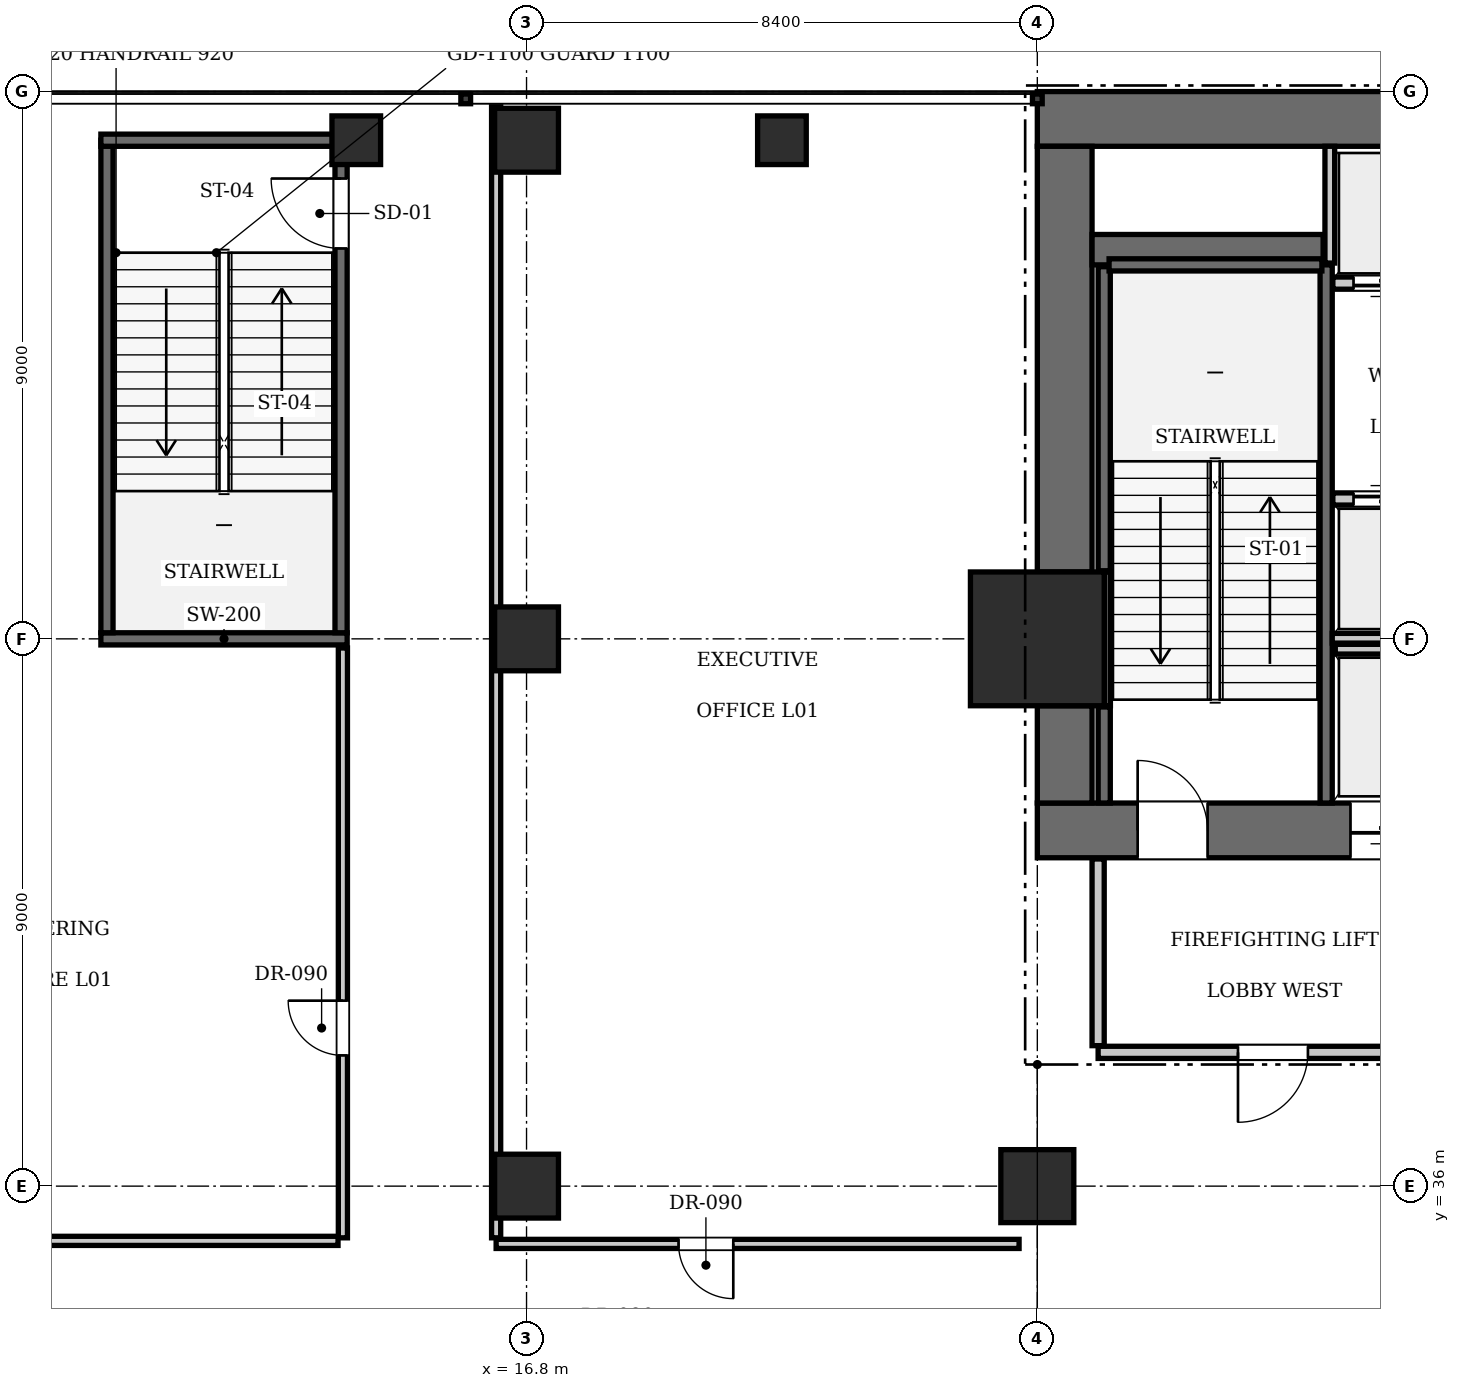
"""IFC4 building model, lengths in metres.
Left out: names, types, materials, properties, quantities, classifications, styles, units other than length and angle.
Written with IfcOpenShell. Run it as: python <this file> out.ifc"""

import sys

from ifc_helpers import new_model, si_unit, direction, frame, frame_2d, origin, origin_2d, place, context, subcontext, project, spatial, rectangle, extrude, element, fill, save


model = new_model("IFC4")
c1 = context("Model", 3, precision=1e-05, world=origin(), true_north=direction((0.0, 1.0)))
c2 = subcontext(c1, "Body", "Model", "MODEL_VIEW")
j1 = project(units=[si_unit("LENGTHUNIT", "METRE"), si_unit("PLANEANGLEUNIT", "RADIAN")], contexts=[c1])
p1 = place(None, origin())
s1 = spatial("IfcSite", under=j1, at=p1, CompositionType="ELEMENT")
p2 = place(p1, origin())
s2 = spatial("IfcBuilding", under=s1, at=p2, CompositionType="ELEMENT")
p3 = place(p2, frame((0.0, 0.0, 5.6)))
s3 = spatial("IfcBuildingStorey", under=s2, at=p3, CompositionType="ELEMENT", Elevation=5.6)
p4 = place(p3, frame((25.2, 45.0, 0.0), z_axis=(0.0, 0.0, 1.0), x_axis=(1.0, 0.0, 0.0)))
e1 = element("IfcColumn", 1, at=p4, inside=s3, PredefinedType="COLUMN", context=c2, shape_type="SweptSolid", body=[
    extrude(rectangle(XDim=2.2, YDim=2.2, at=origin_2d()), origin(), (0.0, 0.0, 1.0), 5.25),
])
p5 = place(p3, frame((25.2, 53.55, 0.0), z_axis=(0.0, 0.0, 1.0), x_axis=(1.0, 0.0, 0.0)))
e2 = element("IfcWall", 2, at=p5, inside=s3, PredefinedType="SHEAR", context=c2, shape_type="SweptSolid", body=[
    extrude(rectangle(XDim=25.2, YDim=0.9, at=frame_2d((12.6, 0.0))), origin(), (0.0, 0.0, 1.0), 5.25),
])
p6 = place(p3, frame((25.2, 41.85, 0.0), z_axis=(0.0, 0.0, 1.0), x_axis=(1.0, 0.0, 0.0)))
e3 = element("IfcWall", 3, at=p6, inside=s3, PredefinedType="SHEAR", context=c2, shape_type="SweptSolid", body=[
    extrude(rectangle(XDim=6.8, YDim=0.9, at=frame_2d((3.4, 0.0))), origin(), (0.0, 0.0, 1.0), 5.25),
])
p7 = place(p6, frame((1.65, 0.0, 0.0)))
e4 = element("IfcOpeningElement", 4, at=p7, cuts=e3, PredefinedType="OPENING", context=c2, shape_type="SweptSolid", body=[
    extrude(rectangle(XDim=1.15, YDim=2.15, at=frame_2d((0.575, 1.075))), frame((0.0, 0.46, 0.0), z_axis=(0.0, -1.0, 0.0), x_axis=(1.0, 0.0, 0.0)), (0.0, 0.0, 1.0), 0.92),
])
p8 = place(p6, frame((5.15, 0.0, 0.0)))
e5 = element("IfcOpeningElement", 5, at=p8, cuts=e3, PredefinedType="OPENING", context=c2, shape_type="SweptSolid", body=[
    extrude(rectangle(XDim=1.1, YDim=2.2, at=frame_2d((0.55, 1.1))), frame((0.0, 0.46, 0.0), z_axis=(0.0, -1.0, 0.0), x_axis=(1.0, 0.0, 0.0)), (0.0, 0.0, 1.0), 0.92),
])
p9 = place(p3, frame((25.65, 42.3, 0.0), z_axis=(0.0, 0.0, 1.0), x_axis=(0.0, 1.0, 0.0)))
e6 = element("IfcWall", 6, at=p9, inside=s3, PredefinedType="SHEAR", context=c2, shape_type="SweptSolid", body=[
    extrude(rectangle(XDim=1.6, YDim=0.9, at=frame_2d((0.8, 0.0))), origin(), (0.0, 0.0, 1.0), 5.25),
])
p10 = place(p3, frame((25.65, 46.1, 0.0), z_axis=(0.0, 0.0, 1.0), x_axis=(0.0, 1.0, 0.0)))
e7 = element("IfcWall", 7, at=p10, inside=s3, PredefinedType="SHEAR", context=c2, shape_type="SweptSolid", body=[
    extrude(rectangle(XDim=7.0, YDim=0.9, at=frame_2d((3.5, 0.0))), origin(), (0.0, 0.0, 1.0), 5.25),
])
p11 = place(p3, frame((26.1, 51.4, 0.0), z_axis=(0.0, 0.0, 1.0), x_axis=(1.0, 0.0, 0.0)))
e8 = element("IfcWall", 8, at=p11, inside=s3, PredefinedType="SHEAR", context=c2, shape_type="SweptSolid", body=[
    extrude(rectangle(XDim=3.8, YDim=0.5, at=frame_2d((1.9, 0.0))), origin(), (0.0, 0.0, 1.0), 5.25),
])
p12 = place(p3, frame((25.2, 36.0, 0.0), z_axis=(0.0, 0.0, 1.0), x_axis=(1.0, 0.0, 0.0)))
e9 = element("IfcColumn", 9, at=p12, inside=s3, PredefinedType="COLUMN", context=c2, shape_type="SweptSolid", body=[
    extrude(rectangle(XDim=1.2, YDim=1.2, at=origin_2d()), origin(), (0.0, 0.0, 1.0), 5.25),
])
for number, where, z_axis, x_axis in (
    (10, (16.8, 36.0, 0.0), (0.0, 0.0, 1.0), (1.0, 0.0, 0.0)),
    (11, (16.8, 45.0, 0.0), (0.0, 0.0, 1.0), (1.0, 0.0, 0.0)),
    (12, (16.8, 53.2, 0.0), (0.0, 0.0, 1.0), (1.0, 0.0, 0.0)),
):
    element("IfcColumn", number, at=place(p3, frame(where, z_axis=z_axis, x_axis=x_axis)), inside=s3, PredefinedType="COLUMN", context=c2, shape_type="SweptSolid", body=[
        extrude(rectangle(XDim=1.05, YDim=1.05, at=origin_2d()), origin(), (0.0, 0.0, 1.0), 5.25),
    ])
for number, where, z_axis, x_axis in (
    (13, (14.0, 53.2, 0.0), (0.0, 0.0, 1.0), (1.0, 0.0, 0.0)),
    (14, (21.0, 53.2, 0.0), (0.0, 0.0, 1.0), (1.0, 0.0, 0.0)),
):
    element("IfcColumn", number, at=place(p3, frame(where, z_axis=z_axis, x_axis=x_axis)), inside=s3, PredefinedType="PILASTER", context=c2, shape_type="SweptSolid", body=[
        extrude(rectangle(XDim=0.8, YDim=0.8, at=origin_2d()), origin(), (0.0, 0.0, 1.0), 5.25),
    ])
p13 = place(p3, frame((29.95, 42.3, 0.0), z_axis=(0.0, 0.0, 1.0), x_axis=(0.0, 1.0, 0.0)))
e15 = element("IfcWall", 15, at=p13, inside=s3, PredefinedType="SOLIDWALL", context=c2, shape_type="SweptSolid", body=[
    extrude(rectangle(XDim=8.85, YDim=0.2, at=frame_2d((4.425, 0.0))), origin(), (0.0, 0.0, 1.0), 4.97),
])
p14 = place(p3, frame((26.3, 42.3, 0.0), z_axis=(0.0, 0.0, 1.0), x_axis=(0.0, 1.0, 0.0)))
e16 = element("IfcWall", 16, at=p14, inside=s3, PredefinedType="SOLIDWALL", context=c2, shape_type="SweptSolid", body=[
    extrude(rectangle(XDim=1.58, YDim=0.2, at=frame_2d((0.79, 0.0))), origin(), (0.0, 0.0, 1.0), 4.97),
])
p15 = place(p3, frame((26.3, 46.12, 0.0), z_axis=(0.0, 0.0, 1.0), x_axis=(0.0, 1.0, 0.0)))
e17 = element("IfcWall", 17, at=p15, inside=s3, PredefinedType="SOLIDWALL", context=c2, shape_type="SweptSolid", body=[
    extrude(rectangle(XDim=5.0, YDim=0.2, at=frame_2d((2.5, 0.0))), origin(), (0.0, 0.0, 1.0), 4.97),
])
p16 = place(p3, frame((26.38, 51.15, 0.0), z_axis=(0.0, 0.0, 1.0), x_axis=(1.0, 0.0, 0.0)))
e18 = element("IfcWall", 18, at=p16, inside=s3, PredefinedType="SOLIDWALL", context=c2, shape_type="SweptSolid", body=[
    extrude(rectangle(XDim=3.5, YDim=0.2, at=frame_2d((1.75, 0.0))), origin(), (0.0, 0.0, 1.0), 4.97),
])
p17 = place(p3, frame((26.352, 43.9, 0.0), z_axis=(0.0, 0.0, 1.0), x_axis=(0.0, 1.0, 0.0)))
e19 = element("IfcWall", 19, at=p17, inside=s3, PredefinedType="SOLIDWALL", context=c2, shape_type="SweptSolid", body=[
    extrude(rectangle(XDim=2.2, YDim=0.1, at=frame_2d((1.1, 0.0))), origin(), (0.0, 0.0, 1.0), 4.97),
])
p18 = place(p3, frame((9.8, 45.0, 0.0), z_axis=(0.0, 0.0, 1.0), x_axis=(1.0, 0.0, 0.0)))
e20 = element("IfcWall", 20, at=p18, inside=s3, PredefinedType="SOLIDWALL", context=c2, shape_type="SweptSolid", body=[
    extrude(rectangle(XDim=4.05, YDim=0.2, at=frame_2d((2.025, 0.0))), origin(), (0.0, 0.0, 1.0), 4.335),
])
p19 = place(p3, frame((9.9, 45.1, 0.0), z_axis=(0.0, 0.0, 1.0), x_axis=(0.0, 1.0, 0.0)))
e21 = element("IfcWall", 21, at=p19, inside=s3, PredefinedType="SOLIDWALL", context=c2, shape_type="SweptSolid", body=[
    extrude(rectangle(XDim=8.1, YDim=0.2, at=frame_2d((4.05, 0.0))), origin(), (0.0, 0.0, 1.0), 4.97),
])
p20 = place(p3, frame((13.75, 45.1, 0.0), z_axis=(0.0, 0.0, 1.0), x_axis=(0.0, 1.0, 0.0)))
e22 = element("IfcWall", 22, at=p20, inside=s3, PredefinedType="SOLIDWALL", context=c2, shape_type="SweptSolid", body=[
    extrude(rectangle(XDim=8.1, YDim=0.2, at=frame_2d((4.05, 0.0))), origin(), (0.0, 0.0, 1.0), 4.97),
])
p21 = place(p20, frame((6.32, 0.0, 0.0)))
e23 = element("IfcOpeningElement", 23, at=p21, cuts=e22, PredefinedType="OPENING", context=c2, shape_type="SweptSolid", body=[
    extrude(rectangle(XDim=1.15, YDim=2.15, at=frame_2d((0.575, 1.075))), frame((0.0, 0.11, 0.0), z_axis=(0.0, -1.0, 0.0), x_axis=(1.0, 0.0, 0.0)), (0.0, 0.0, 1.0), 0.22),
])
p22 = place(p3, frame((9.8, 53.2, 0.0), z_axis=(0.0, 0.0, 1.0), x_axis=(1.0, 0.0, 0.0)))
e24 = element("IfcWall", 24, at=p22, inside=s3, PredefinedType="SOLIDWALL", context=c2, shape_type="SweptSolid", body=[
    extrude(rectangle(XDim=4.05, YDim=0.2, at=frame_2d((2.025, 0.0))), origin(), (0.0, 0.0, 1.0), 4.97),
])
p23 = place(p3, frame((30.06, 47.3, 0.0), z_axis=(0.0, 0.0, 1.0), x_axis=(1.0, 0.0, 0.0)))
e25 = element("IfcWall", 25, at=p23, inside=s3, PredefinedType="SOLIDWALL", context=c2, shape_type="SweptSolid", body=[
    extrude(rectangle(XDim=1.68, YDim=0.2, at=frame_2d((0.84, 0.0))), origin(), (0.0, 0.0, 1.0), 4.97),
])
p24 = place(p23, frame((0.34, 0.0, 0.0)))
e26 = element("IfcOpeningElement", 26, at=p24, cuts=e25, PredefinedType="OPENING", context=c2, shape_type="SweptSolid", body=[
    extrude(rectangle(XDim=1.0, YDim=2.15, at=frame_2d((0.5, 1.075))), frame((0.0, 0.11, 0.0), z_axis=(0.0, -1.0, 0.0), x_axis=(1.0, 0.0, 0.0)), (0.0, 0.0, 1.0), 0.22),
])
p25 = place(p3, frame((30.06, 50.85, 0.0), z_axis=(0.0, 0.0, 1.0), x_axis=(1.0, 0.0, 0.0)))
e27 = element("IfcWall", 27, at=p25, inside=s3, PredefinedType="SOLIDWALL", context=c2, shape_type="SweptSolid", body=[
    extrude(rectangle(XDim=1.68, YDim=0.2, at=frame_2d((0.84, 0.0))), origin(), (0.0, 0.0, 1.0), 4.97),
])
p26 = place(p25, frame((0.34, 0.0, 0.0)))
e28 = element("IfcOpeningElement", 28, at=p26, cuts=e27, PredefinedType="OPENING", context=c2, shape_type="SweptSolid", body=[
    extrude(rectangle(XDim=1.0, YDim=2.15, at=frame_2d((0.5, 1.075))), frame((0.0, 0.11, 0.0), z_axis=(0.0, -1.0, 0.0), x_axis=(1.0, 0.0, 0.0)), (0.0, 0.0, 1.0), 0.22),
])
p27 = place(p3, frame((30.1, 44.83, 0.0), z_axis=(0.0, 0.0, 1.0), x_axis=(1.0, 0.0, 0.0)))
e29 = element("IfcWall", 29, at=p27, inside=s3, PredefinedType="SOLIDWALL", context=c2, shape_type="SweptSolid", body=[
    extrude(rectangle(XDim=1.6, YDim=0.16, at=frame_2d((0.8, 0.0))), origin(), (0.0, 0.0, 1.0), 4.97),
])
p28 = place(p3, frame((30.05, 45.01, 0.0), z_axis=(0.0, 0.0, 1.0), x_axis=(1.0, 0.0, 0.0)))
e30 = element("IfcWall", 30, at=p28, inside=s3, PredefinedType="SOLIDWALL", context=c2, shape_type="SweptSolid", body=[
    extrude(rectangle(XDim=3.45, YDim=0.16, at=frame_2d((1.725, 0.0))), origin(), (0.0, 0.0, 1.0), 4.97),
])
p29 = place(p3, frame((30.01, 51.18, 0.0), z_axis=(0.0, 0.0, 1.0), x_axis=(0.0, 1.0, 0.0)))
e31 = element("IfcWall", 31, at=p29, inside=s3, PredefinedType="SOLIDWALL", context=c2, shape_type="SweptSolid", body=[
    extrude(rectangle(XDim=1.92, YDim=0.16, at=frame_2d((0.96, 0.0))), origin(), (0.0, 0.0, 1.0), 4.97),
])
p30 = place(p3, frame((26.2, 38.2, 0.0), z_axis=(0.0, 0.0, 1.0), x_axis=(1.0, 0.0, 0.0)))
e32 = element("IfcWall", 32, at=p30, inside=s3, PredefinedType="PARTITIONING", context=c2, shape_type="SweptSolid", body=[
    extrude(rectangle(XDim=5.8, YDim=0.2, at=frame_2d((2.9, 0.0))), origin(), (0.0, 0.0, 1.0), 4.97),
])
p31 = place(p30, frame((2.3, 0.0, 0.0)))
e33 = element("IfcOpeningElement", 33, at=p31, cuts=e32, PredefinedType="OPENING", context=c2, shape_type="SweptSolid", body=[
    extrude(rectangle(XDim=1.15, YDim=2.15, at=frame_2d((0.575, 1.075))), frame((0.0, 0.11, 0.0), z_axis=(0.0, -1.0, 0.0), x_axis=(1.0, 0.0, 0.0)), (0.0, 0.0, 1.0), 0.22),
])
p32 = place(p3, frame((26.2, 38.31, 0.0), z_axis=(0.0, 0.0, 1.0), x_axis=(0.0, 1.0, 0.0)))
e34 = element("IfcWall", 34, at=p32, inside=s3, PredefinedType="PARTITIONING", context=c2, shape_type="SweptSolid", body=[
    extrude(rectangle(XDim=3.07, YDim=0.2, at=frame_2d((1.535, 0.0))), origin(), (0.0, 0.0, 1.0), 4.97),
])
p33 = place(p3, frame((16.3, 35.05, 0.0), z_axis=(0.0, 0.0, 1.0), x_axis=(1.0, 0.0, 0.0)))
e35 = element("IfcWall", 35, at=p33, inside=s3, PredefinedType="PARTITIONING", context=c2, shape_type="SweptSolid", body=[
    extrude(rectangle(XDim=8.6, YDim=0.15, at=frame_2d((4.3, 0.0))), origin(), (0.0, 0.0, 1.0), 4.97),
])
p34 = place(p33, frame((3.0, 0.0, 0.0)))
e36 = element("IfcOpeningElement", 36, at=p34, cuts=e35, PredefinedType="OPENING", context=c2, shape_type="SweptSolid", body=[
    extrude(rectangle(XDim=0.9, YDim=2.1, at=frame_2d((0.45, 1.05))), frame((0.0, 0.085, 0.0), z_axis=(0.0, -1.0, 0.0), x_axis=(1.0, 0.0, 0.0)), (0.0, 0.0, 1.0), 0.17),
])
p35 = place(p3, frame((16.3, 35.15, 0.0), z_axis=(0.0, 0.0, 1.0), x_axis=(0.0, 1.0, 0.0)))
e37 = element("IfcWall", 37, at=p35, inside=s3, PredefinedType="PARTITIONING", context=c2, shape_type="SweptSolid", body=[
    extrude(rectangle(XDim=18.6, YDim=0.15, at=frame_2d((9.3, 0.0))), origin(), (0.0, 0.0, 1.0), 4.97),
])
p36 = place(p3, frame((13.78, 35.15, 0.0), z_axis=(0.0, 0.0, 1.0), x_axis=(0.0, 1.0, 0.0)))
e38 = element("IfcWall", 38, at=p36, inside=s3, PredefinedType="PARTITIONING", context=c2, shape_type="SweptSolid", body=[
    extrude(rectangle(XDim=9.7, YDim=0.15, at=frame_2d((4.85, 0.0))), origin(), (0.0, 0.0, 1.0), 4.97),
])
p37 = place(p36, frame((3.0, 0.0, 0.0)))
e39 = element("IfcOpeningElement", 39, at=p37, cuts=e38, PredefinedType="OPENING", context=c2, shape_type="SweptSolid", body=[
    extrude(rectangle(XDim=0.9, YDim=2.1, at=frame_2d((0.45, 1.05))), frame((0.0, 0.085, 0.0), z_axis=(0.0, -1.0, 0.0), x_axis=(1.0, 0.0, 0.0)), (0.0, 0.0, 1.0), 0.17),
])
p38 = place(p3, frame((4.35, 35.1, 0.0), z_axis=(0.0, 0.0, 1.0), x_axis=(1.0, 0.0, 0.0)))
e40 = element("IfcWall", 40, at=p38, inside=s3, PredefinedType="PARTITIONING", context=c2, shape_type="SweptSolid", body=[
    extrude(rectangle(XDim=9.35, YDim=0.15, at=frame_2d((4.675, 0.0))), origin(), (0.0, 0.0, 1.0), 4.97),
])
p39 = place(p7, origin())
e41 = element("IfcDoor", 41, at=p39, inside=s3, OperationType="SINGLE_SWING_LEFT", PredefinedType="DOOR", context=c2, shape_type="SweptSolid", body=[
    extrude(rectangle(XDim=1.15, YDim=2.15, at=frame_2d((0.575, 1.075))), frame((0.0, 0.025, 0.0), z_axis=(0.0, -1.0, 0.0), x_axis=(1.0, 0.0, 0.0)), (0.0, 0.0, 1.0), 0.05),
])
fill(e4, e41)
p40 = place(p21, origin())
e42 = element("IfcDoor", 42, at=p40, inside=s3, OperationType="SINGLE_SWING_RIGHT", PredefinedType="DOOR", context=c2, shape_type="SweptSolid", body=[
    extrude(rectangle(XDim=1.15, YDim=2.15, at=frame_2d((0.575, 1.075))), frame((0.0, 0.025, 0.0), z_axis=(0.0, -1.0, 0.0), x_axis=(1.0, 0.0, 0.0)), (0.0, 0.0, 1.0), 0.05),
])
fill(e23, e42)
p41 = place(p24, origin())
e43 = element("IfcDoor", 43, at=p41, inside=s3, OperationType="SLIDING_TO_LEFT", PredefinedType="DOOR", context=c2, shape_type="SweptSolid", body=[
    extrude(rectangle(XDim=1.0, YDim=2.15, at=frame_2d((0.5, 1.075))), frame((0.0, 0.025, 0.0), z_axis=(0.0, -1.0, 0.0), x_axis=(1.0, 0.0, 0.0)), (0.0, 0.0, 1.0), 0.05),
])
fill(e26, e43)
p42 = place(p26, frame((1.0, 0.0, 0.0), z_axis=(0.0, 0.0, 1.0), x_axis=(-1.0, 0.0, 0.0)))
e44 = element("IfcDoor", 44, at=p42, inside=s3, OperationType="SLIDING_TO_LEFT", PredefinedType="DOOR", context=c2, shape_type="SweptSolid", body=[
    extrude(rectangle(XDim=1.0, YDim=2.15, at=frame_2d((0.5, 1.075))), frame((0.0, 0.025, 0.0), z_axis=(0.0, -1.0, 0.0), x_axis=(1.0, 0.0, 0.0)), (0.0, 0.0, 1.0), 0.05),
])
fill(e28, e44)
p43 = place(p8, frame((1.1, 0.0, 0.0), z_axis=(0.0, 0.0, 1.0), x_axis=(-1.0, 0.0, 0.0)))
e45 = element("IfcDoor", 45, at=p43, inside=s3, OperationType="SLIDING_TO_LEFT", PredefinedType="DOOR", context=c2, shape_type="SweptSolid", body=[
    extrude(rectangle(XDim=1.1, YDim=2.2, at=frame_2d((0.55, 1.1))), frame((0.0, 0.025, 0.0), z_axis=(0.0, -1.0, 0.0), x_axis=(1.0, 0.0, 0.0)), (0.0, 0.0, 1.0), 0.05),
])
fill(e5, e45)
p44 = place(p31, frame((1.15, 0.0, 0.0), z_axis=(0.0, 0.0, 1.0), x_axis=(-1.0, 0.0, 0.0)))
e46 = element("IfcDoor", 46, at=p44, inside=s3, OperationType="SINGLE_SWING_RIGHT", PredefinedType="DOOR", context=c2, shape_type="SweptSolid", body=[
    extrude(rectangle(XDim=1.15, YDim=2.15, at=frame_2d((0.575, 1.075))), frame((0.0, 0.025, 0.0), z_axis=(0.0, -1.0, 0.0), x_axis=(1.0, 0.0, 0.0)), (0.0, 0.0, 1.0), 0.05),
])
fill(e33, e46)
p45 = place(p34, frame((0.9, 0.0, 0.0), z_axis=(0.0, 0.0, 1.0), x_axis=(-1.0, 0.0, 0.0)))
e47 = element("IfcDoor", 47, at=p45, inside=s3, OperationType="SINGLE_SWING_LEFT", PredefinedType="DOOR", context=c2, shape_type="SweptSolid", body=[
    extrude(rectangle(XDim=0.9, YDim=2.1, at=frame_2d((0.45, 1.05))), frame((0.0, 0.025, 0.0), z_axis=(0.0, -1.0, 0.0), x_axis=(1.0, 0.0, 0.0)), (0.0, 0.0, 1.0), 0.05),
])
fill(e36, e47)
p46 = place(p37, origin())
e48 = element("IfcDoor", 48, at=p46, inside=s3, OperationType="SINGLE_SWING_RIGHT", PredefinedType="DOOR", context=c2, shape_type="SweptSolid", body=[
    extrude(rectangle(XDim=0.9, YDim=2.1, at=frame_2d((0.45, 1.05))), frame((0.0, 0.025, 0.0), z_axis=(0.0, -1.0, 0.0), x_axis=(1.0, 0.0, 0.0)), (0.0, 0.0, 1.0), 0.05),
])
fill(e39, e48)
save(model, sys.argv[1])
